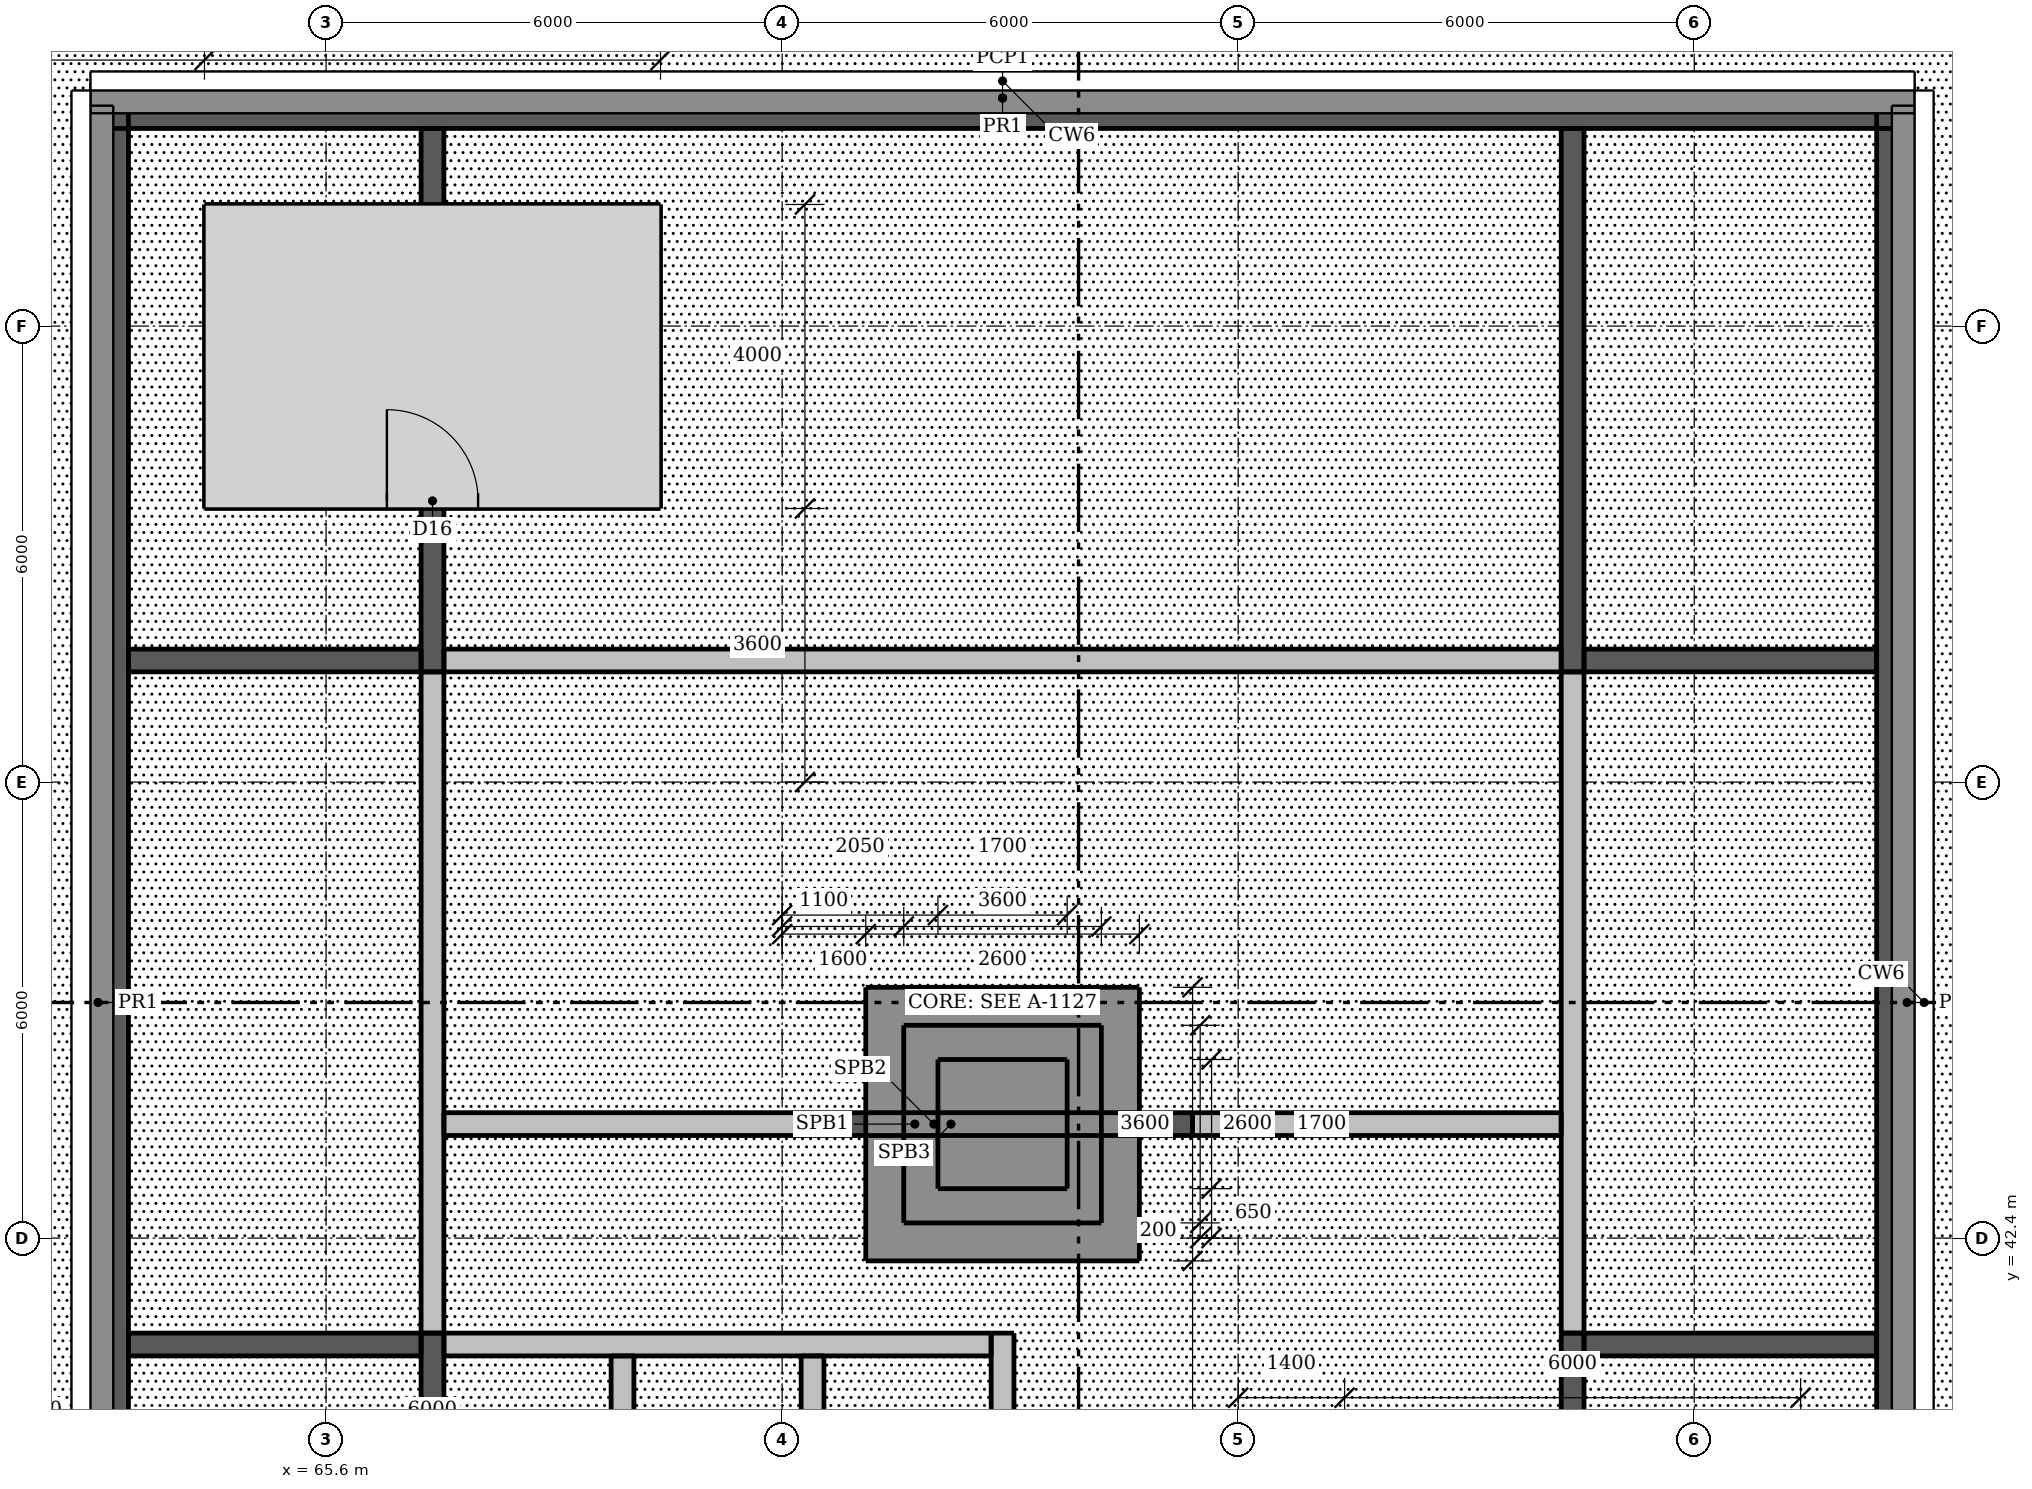
"""IFC4 building model, lengths in metres.
Left out: names, types, materials, properties, quantities, classifications, styles, units other than length and angle.
Written with IfcOpenShell. Run it as: python <this file> out.ifc"""

import sys

from ifc_helpers import new_model, si_unit, direction, frame, frame_2d, origin, place, context, subcontext, project, spatial, polyline, rectangle, outline, extrude, element, fill, save


model = new_model("IFC4")
c1 = context("Model", 3, precision=1e-05, world=origin(), true_north=direction((0.0, 1.0)))
c2 = subcontext(c1, "Body", "Model", "MODEL_VIEW")
j1 = project(units=[si_unit("LENGTHUNIT", "METRE"), si_unit("PLANEANGLEUNIT", "RADIAN")], contexts=[c1])
p1 = place(None, origin())
s1 = spatial("IfcSite", under=j1, at=p1, CompositionType="ELEMENT")
p2 = place(p1, origin())
s2 = spatial("IfcBuilding", under=s1, at=p2, CompositionType="ELEMENT")
p3 = place(p2, frame((0.0, 0.0, 301.6)))
s3 = spatial("IfcBuildingStorey", under=s2, at=p3, CompositionType="ELEMENT", Elevation=301.6)
for number, where, z_axis, x_axis in (
    (1, (62.5, 57.25, 0.0), (0.0, 0.0, 1.0), (1.0, 0.0, 0.0)),
    (2, (62.75, 33.5, 0.0), (0.0, 0.0, 1.0), (0.0, 1.0, 0.0)),
    (3, (86.25, 33.5, 0.0), (0.0, 0.0, 1.0), (0.0, 1.0, 0.0)),
):
    element("IfcWall", number, at=place(p3, frame(where, z_axis=z_axis, x_axis=x_axis)), inside=s3, PredefinedType="SHEAR", context=c2, shape_type="SweptSolid", body=[
        extrude(rectangle(XDim=24.0, YDim=0.5, at=frame_2d((12.0, 0.0))), origin(), (0.0, 0.0, 1.0), 6.9),
    ])
p4 = place(p3, frame((72.0, 43.9, 0.0), z_axis=(0.0, 0.0, 1.0), x_axis=(1.0, 0.0, 0.0)))
e4 = element("IfcWall", 4, at=p4, inside=s3, PredefinedType="SHEAR", context=c2, shape_type="SweptSolid", body=[
    extrude(rectangle(XDim=5.0, YDim=0.3, at=frame_2d((2.5, 0.0))), origin(), (0.0, 0.0, 1.0), 6.9),
])
p5 = place(p3, frame((62.5, 57.4, 7.2), z_axis=(0.0, 0.0, 1.0), x_axis=(1.0, 0.0, 0.0)))
e5 = element("IfcWall", 5, at=p5, inside=s3, PredefinedType="PARAPET", context=c2, shape_type="SweptSolid", body=[
    extrude(rectangle(XDim=24.0, YDim=0.2, at=frame_2d((12.0, 0.0))), origin(), (0.0, 0.0, 1.0), 1.1),
])
for number, where, z_axis, x_axis in (
    (6, (62.6, 33.7, 7.2), (0.0, 0.0, 1.0), (0.0, 1.0, 0.0)),
    (7, (86.4, 33.7, 7.2), (0.0, 0.0, 1.0), (0.0, 1.0, 0.0)),
):
    element("IfcWall", number, at=place(p3, frame(where, z_axis=z_axis, x_axis=x_axis)), inside=s3, PredefinedType="PARAPET", context=c2, shape_type="SweptSolid", body=[
        extrude(rectangle(XDim=23.6, YDim=0.2, at=frame_2d((11.8, 0.0))), origin(), (0.0, 0.0, 1.0), 1.1),
    ])
p6 = place(p3, frame((0.0, 0.0, 7.2)))
e8 = element("IfcWall", 8, at=p6, inside=s3, PredefinedType="SOLIDWALL", context=c2, shape_type="SweptSolid", body=[
    extrude(outline(polyline([(72.7, 42.1), (76.3, 42.1), (76.3, 45.7), (72.7, 45.7), (72.7, 42.1)]), holes=[polyline([(75.008, 44.111), (74.71, 44.408), (74.29, 44.408), (73.992, 44.111), (73.992, 43.689), (74.29, 43.392), (74.71, 43.392), (75.008, 43.689), (75.008, 44.111)])]), origin(), (0.0, 0.0, 1.0), 2.6),
])
p7 = place(p3, frame((0.0, 0.0, 9.8)))
e9 = element("IfcWall", 9, at=p7, inside=s3, PredefinedType="SOLIDWALL", context=c2, shape_type="SweptSolid", body=[
    extrude(outline(polyline([(73.2, 42.6), (75.8, 42.6), (75.8, 45.2), (73.2, 45.2), (73.2, 42.6)]), holes=[polyline([(75.008, 44.111), (74.71, 44.408), (74.29, 44.408), (73.992, 44.111), (73.992, 43.689), (74.29, 43.392), (74.71, 43.392), (75.008, 43.689), (75.008, 44.111)])]), origin(), (0.0, 0.0, 1.0), 2.6),
])
p8 = place(p3, frame((0.0, 0.0, 12.4)))
e10 = element("IfcWall", 10, at=p8, inside=s3, PredefinedType="SOLIDWALL", context=c2, shape_type="SweptSolid", body=[
    extrude(outline(polyline([(73.65, 43.05), (75.35, 43.05), (75.35, 44.75), (73.65, 44.75), (73.65, 43.05)]), holes=[polyline([(75.008, 44.111), (74.71, 44.408), (74.29, 44.408), (73.992, 44.111), (73.992, 43.689), (74.29, 43.392), (74.71, 43.392), (75.008, 43.689), (75.008, 44.111)])]), origin(), (0.0, 0.0, 1.0), 2.2),
])
p9 = place(p3, frame((64.0, 52.1, 7.2), z_axis=(0.0, 0.0, 1.0), x_axis=(1.0, 0.0, 0.0)))
e11 = element("IfcWall", 11, at=p9, inside=s3, PredefinedType="SOLIDWALL", context=c2, shape_type="SweptSolid", body=[
    extrude(rectangle(XDim=6.0, YDim=0.2, at=frame_2d((3.0, 0.0))), origin(), (0.0, 0.0, 1.0), 3.0),
])
p10 = place(p9, frame((2.4, 0.0, 0.0)))
e12 = element("IfcOpeningElement", 12, at=p10, cuts=e11, PredefinedType="OPENING", context=c2, shape_type="SweptSolid", body=[
    extrude(rectangle(XDim=1.2, YDim=2.1, at=frame_2d((0.6, 1.05))), frame((0.0, 0.11, 0.0), z_axis=(0.0, -1.0, 0.0), x_axis=(1.0, 0.0, 0.0)), (0.0, 0.0, 1.0), 0.22),
])
p11 = place(p3, frame((64.0, 55.9, 7.2), z_axis=(0.0, 0.0, 1.0), x_axis=(1.0, 0.0, 0.0)))
e13 = element("IfcWall", 13, at=p11, inside=s3, PredefinedType="SOLIDWALL", context=c2, shape_type="SweptSolid", body=[
    extrude(rectangle(XDim=6.0, YDim=0.2, at=frame_2d((3.0, 0.0))), origin(), (0.0, 0.0, 1.0), 3.0),
])
for number, where, z_axis, x_axis in (
    (14, (64.1, 52.2, 7.2), (0.0, 0.0, 1.0), (0.0, 1.0, 0.0)),
    (15, (69.9, 52.2, 7.2), (0.0, 0.0, 1.0), (0.0, 1.0, 0.0)),
):
    element("IfcWall", number, at=place(p3, frame(where, z_axis=z_axis, x_axis=x_axis)), inside=s3, PredefinedType="SOLIDWALL", context=c2, shape_type="SweptSolid", body=[
        extrude(rectangle(XDim=3.6, YDim=0.2, at=frame_2d((1.8, 0.0))), origin(), (0.0, 0.0, 1.0), 3.0),
    ])
p12 = place(p3, frame((67.0, 34.0, 0.0), z_axis=(0.0, 0.0, 1.0), x_axis=(0.0, 1.0, 0.0)))
e16 = element("IfcWall", 16, at=p12, inside=s3, PredefinedType="SHEAR", context=c2, shape_type="SweptSolid", body=[
    extrude(rectangle(XDim=7.15, YDim=0.3, at=frame_2d((3.575, 0.0))), origin(), (0.0, 0.0, 1.0), 6.9),
])
p13 = place(p12, frame((0.2, 0.0, 0.0)))
e17 = element("IfcOpeningElement", 17, at=p13, cuts=e16, PredefinedType="OPENING", context=c2, shape_type="SweptSolid", body=[
    extrude(rectangle(XDim=1.1, YDim=2.1, at=frame_2d((0.55, 1.05))), frame((0.0, 0.16, 0.0), z_axis=(0.0, -1.0, 0.0), x_axis=(1.0, 0.0, 0.0)), (0.0, 0.0, 1.0), 0.32),
])
p14 = place(p3, frame((67.0, 41.15, 0.0), z_axis=(0.0, 0.0, 1.0), x_axis=(0.0, 1.0, 0.0)))
e18 = element("IfcWall", 18, at=p14, inside=s3, PredefinedType="PARTITIONING", context=c2, shape_type="SweptSolid", body=[
    extrude(rectangle(XDim=8.7, YDim=0.3, at=frame_2d((4.35, 0.0))), origin(), (0.0, 0.0, 1.0), 6.9),
])
p15 = place(p14, frame((3.9, 0.0, 0.0)))
e19 = element("IfcOpeningElement", 19, at=p15, cuts=e18, PredefinedType="OPENING", context=c2, shape_type="SweptSolid", body=[
    extrude(rectangle(XDim=0.9, YDim=2.1, at=frame_2d((0.45, 1.05))), frame((0.0, 0.16, 0.0), z_axis=(0.0, -1.0, 0.0), x_axis=(1.0, 0.0, 0.0)), (0.0, 0.0, 1.0), 0.32),
])
p16 = place(p3, frame((67.0, 49.85, 0.0), z_axis=(0.0, 0.0, 1.0), x_axis=(0.0, 1.0, 0.0)))
e20 = element("IfcWall", 20, at=p16, inside=s3, PredefinedType="SHEAR", context=c2, shape_type="SweptSolid", body=[
    extrude(rectangle(XDim=7.15, YDim=0.3, at=frame_2d((3.575, 0.0))), origin(), (0.0, 0.0, 1.0), 6.9),
])
p17 = place(p16, frame((5.85, 0.0, 0.0)))
e21 = element("IfcOpeningElement", 21, at=p17, cuts=e20, PredefinedType="OPENING", context=c2, shape_type="SweptSolid", body=[
    extrude(rectangle(XDim=1.1, YDim=2.1, at=frame_2d((0.55, 1.05))), frame((0.0, 0.16, 0.0), z_axis=(0.0, -1.0, 0.0), x_axis=(1.0, 0.0, 0.0)), (0.0, 0.0, 1.0), 0.32),
])
p18 = place(p3, frame((82.0, 34.0, 0.0), z_axis=(0.0, 0.0, 1.0), x_axis=(0.0, 1.0, 0.0)))
e22 = element("IfcWall", 22, at=p18, inside=s3, PredefinedType="SHEAR", context=c2, shape_type="SweptSolid", body=[
    extrude(rectangle(XDim=7.15, YDim=0.3, at=frame_2d((3.575, 0.0))), origin(), (0.0, 0.0, 1.0), 6.9),
])
p19 = place(p18, frame((0.2, 0.0, 0.0)))
e23 = element("IfcOpeningElement", 23, at=p19, cuts=e22, PredefinedType="OPENING", context=c2, shape_type="SweptSolid", body=[
    extrude(rectangle(XDim=1.1, YDim=2.1, at=frame_2d((0.55, 1.05))), frame((0.0, 0.16, 0.0), z_axis=(0.0, -1.0, 0.0), x_axis=(1.0, 0.0, 0.0)), (0.0, 0.0, 1.0), 0.32),
])
p20 = place(p3, frame((82.0, 41.15, 0.0), z_axis=(0.0, 0.0, 1.0), x_axis=(0.0, 1.0, 0.0)))
e24 = element("IfcWall", 24, at=p20, inside=s3, PredefinedType="PARTITIONING", context=c2, shape_type="SweptSolid", body=[
    extrude(rectangle(XDim=8.7, YDim=0.3, at=frame_2d((4.35, 0.0))), origin(), (0.0, 0.0, 1.0), 6.9),
])
p21 = place(p20, frame((3.9, 0.0, 0.0)))
e25 = element("IfcOpeningElement", 25, at=p21, cuts=e24, PredefinedType="OPENING", context=c2, shape_type="SweptSolid", body=[
    extrude(rectangle(XDim=0.9, YDim=2.1, at=frame_2d((0.45, 1.05))), frame((0.0, 0.16, 0.0), z_axis=(0.0, -1.0, 0.0), x_axis=(1.0, 0.0, 0.0)), (0.0, 0.0, 1.0), 0.32),
])
p22 = place(p3, frame((82.0, 49.85, 0.0), z_axis=(0.0, 0.0, 1.0), x_axis=(0.0, 1.0, 0.0)))
e26 = element("IfcWall", 26, at=p22, inside=s3, PredefinedType="SHEAR", context=c2, shape_type="SweptSolid", body=[
    extrude(rectangle(XDim=7.15, YDim=0.3, at=frame_2d((3.575, 0.0))), origin(), (0.0, 0.0, 1.0), 6.9),
])
p23 = place(p22, frame((5.85, 0.0, 0.0)))
e27 = element("IfcOpeningElement", 27, at=p23, cuts=e26, PredefinedType="OPENING", context=c2, shape_type="SweptSolid", body=[
    extrude(rectangle(XDim=1.1, YDim=2.1, at=frame_2d((0.55, 1.05))), frame((0.0, 0.16, 0.0), z_axis=(0.0, -1.0, 0.0), x_axis=(1.0, 0.0, 0.0)), (0.0, 0.0, 1.0), 0.32),
])
for number, where, z_axis, x_axis in (
    (28, (63.0, 41.0, 0.0), (0.0, 0.0, 1.0), (1.0, 0.0, 0.0)),
    (29, (82.15, 41.0, 0.0), (0.0, 0.0, 1.0), (1.0, 0.0, 0.0)),
    (30, (63.0, 50.0, 0.0), (0.0, 0.0, 1.0), (1.0, 0.0, 0.0)),
    (31, (82.15, 50.0, 0.0), (0.0, 0.0, 1.0), (1.0, 0.0, 0.0)),
):
    element("IfcWall", number, at=place(p3, frame(where, z_axis=z_axis, x_axis=x_axis)), inside=s3, PredefinedType="SHEAR", context=c2, shape_type="SweptSolid", body=[
        extrude(rectangle(XDim=3.85, YDim=0.3, at=frame_2d((1.925, 0.0))), origin(), (0.0, 0.0, 1.0), 6.9),
    ])
p24 = place(p3, frame((67.15, 50.0, 0.0), z_axis=(0.0, 0.0, 1.0), x_axis=(1.0, 0.0, 0.0)))
e32 = element("IfcWall", 32, at=p24, inside=s3, PredefinedType="PARTITIONING", context=c2, shape_type="SweptSolid", body=[
    extrude(rectangle(XDim=14.7, YDim=0.3, at=frame_2d((7.35, 0.0))), origin(), (0.0, 0.0, 1.0), 6.9),
])
p25 = place(p24, frame((6.9, 0.0, 0.0)))
e33 = element("IfcOpeningElement", 33, at=p25, cuts=e32, PredefinedType="OPENING", context=c2, shape_type="SweptSolid", body=[
    extrude(rectangle(XDim=0.9, YDim=2.1, at=frame_2d((0.45, 1.05))), frame((0.0, 0.16, 0.0), z_axis=(0.0, -1.0, 0.0), x_axis=(1.0, 0.0, 0.0)), (0.0, 0.0, 1.0), 0.32),
])
p26 = place(p3, frame((67.15, 43.9, 0.0), z_axis=(0.0, 0.0, 1.0), x_axis=(1.0, 0.0, 0.0)))
e34 = element("IfcWall", 34, at=p26, inside=s3, PredefinedType="PARTITIONING", context=c2, shape_type="SweptSolid", body=[
    extrude(rectangle(XDim=4.85, YDim=0.3, at=frame_2d((2.425, 0.0))), origin(), (0.0, 0.0, 1.0), 6.9),
])
p27 = place(p26, frame((1.9, 0.0, 0.0)))
e35 = element("IfcOpeningElement", 35, at=p27, cuts=e34, PredefinedType="OPENING", context=c2, shape_type="SweptSolid", body=[
    extrude(rectangle(XDim=0.9, YDim=2.1, at=frame_2d((0.45, 1.05))), frame((0.0, 0.16, 0.0), z_axis=(0.0, -1.0, 0.0), x_axis=(1.0, 0.0, 0.0)), (0.0, 0.0, 1.0), 0.32),
])
p28 = place(p3, frame((77.0, 43.9, 0.0), z_axis=(0.0, 0.0, 1.0), x_axis=(1.0, 0.0, 0.0)))
e36 = element("IfcWall", 36, at=p28, inside=s3, PredefinedType="PARTITIONING", context=c2, shape_type="SweptSolid", body=[
    extrude(rectangle(XDim=4.85, YDim=0.3, at=frame_2d((2.425, 0.0))), origin(), (0.0, 0.0, 1.0), 6.9),
])
p29 = place(p3, frame((67.15, 41.0, 0.0), z_axis=(0.0, 0.0, 1.0), x_axis=(1.0, 0.0, 0.0)))
e37 = element("IfcWall", 37, at=p29, inside=s3, PredefinedType="PARTITIONING", context=c2, shape_type="SweptSolid", body=[
    extrude(rectangle(XDim=7.2, YDim=0.3, at=frame_2d((3.6, 0.0))), origin(), (0.0, 0.0, 1.0), 6.9),
])
for number, where, z_axis, x_axis in (
    (38, (69.5, 38.25, 0.0), (0.0, 0.0, 1.0), (0.0, 1.0, 0.0)),
    (39, (72.0, 38.25, 0.0), (0.0, 0.0, 1.0), (0.0, 1.0, 0.0)),
):
    element("IfcWall", number, at=place(p3, frame(where, z_axis=z_axis, x_axis=x_axis)), inside=s3, PredefinedType="PARTITIONING", context=c2, shape_type="SweptSolid", body=[
        extrude(rectangle(XDim=2.6, YDim=0.3, at=frame_2d((1.3, 0.0))), origin(), (0.0, 0.0, 1.0), 6.9),
    ])
p30 = place(p3, frame((74.5, 37.95, 0.0), z_axis=(0.0, 0.0, 1.0), x_axis=(0.0, 1.0, 0.0)))
e40 = element("IfcWall", 40, at=p30, inside=s3, PredefinedType="PARTITIONING", context=c2, shape_type="SweptSolid", body=[
    extrude(rectangle(XDim=3.2, YDim=0.3, at=frame_2d((1.6, 0.0))), origin(), (0.0, 0.0, 1.0), 6.9),
])
p31 = place(p10, origin())
e41 = element("IfcDoor", 41, at=p31, inside=s3, OperationType="SINGLE_SWING_LEFT", PredefinedType="DOOR", context=c2, shape_type="SweptSolid", body=[
    extrude(rectangle(XDim=1.2, YDim=2.1, at=frame_2d((0.6, 1.05))), frame((0.0, 0.025, 0.0), z_axis=(0.0, -1.0, 0.0), x_axis=(1.0, 0.0, 0.0)), (0.0, 0.0, 1.0), 0.05),
])
fill(e12, e41)
p32 = place(p17, origin())
e42 = element("IfcDoor", 42, at=p32, inside=s3, OperationType="SINGLE_SWING_LEFT", PredefinedType="DOOR", context=c2, shape_type="SweptSolid", body=[
    extrude(rectangle(XDim=1.1, YDim=2.1, at=frame_2d((0.55, 1.05))), frame((0.0, 0.138, 0.0), z_axis=(0.0, -1.0, 0.0), x_axis=(1.0, 0.0, 0.0)), (0.0, 0.0, 1.0), 0.05),
])
fill(e21, e42)
p33 = place(p23, origin())
e43 = element("IfcDoor", 43, at=p33, inside=s3, OperationType="SINGLE_SWING_RIGHT", PredefinedType="DOOR", context=c2, shape_type="SweptSolid", body=[
    extrude(rectangle(XDim=1.1, YDim=2.1, at=frame_2d((0.55, 1.05))), frame((0.0, -0.087, 0.0), z_axis=(0.0, -1.0, 0.0), x_axis=(1.0, 0.0, 0.0)), (0.0, 0.0, 1.0), 0.05),
])
fill(e27, e43)
p34 = place(p27, origin())
e44 = element("IfcDoor", 44, at=p34, inside=s3, OperationType="SINGLE_SWING_LEFT", PredefinedType="DOOR", context=c2, shape_type="SweptSolid", body=[
    extrude(rectangle(XDim=0.9, YDim=2.1, at=frame_2d((0.45, 1.05))), frame((0.0, 0.138, 0.0), z_axis=(0.0, -1.0, 0.0), x_axis=(1.0, 0.0, 0.0)), (0.0, 0.0, 1.0), 0.05),
])
fill(e35, e44)
p35 = place(p25, origin())
e45 = element("IfcDoor", 45, at=p35, inside=s3, OperationType="SINGLE_SWING_RIGHT", PredefinedType="DOOR", context=c2, shape_type="SweptSolid", body=[
    extrude(rectangle(XDim=0.9, YDim=2.1, at=frame_2d((0.45, 1.05))), frame((0.0, -0.087, 0.0), z_axis=(0.0, -1.0, 0.0), x_axis=(1.0, 0.0, 0.0)), (0.0, 0.0, 1.0), 0.05),
])
fill(e33, e45)
p36 = place(p15, origin())
e46 = element("IfcDoor", 46, at=p36, inside=s3, OperationType="SINGLE_SWING_LEFT", PredefinedType="DOOR", context=c2, shape_type="SweptSolid", body=[
    extrude(rectangle(XDim=0.9, YDim=2.1, at=frame_2d((0.45, 1.05))), frame((0.0, 0.138, 0.0), z_axis=(0.0, -1.0, 0.0), x_axis=(1.0, 0.0, 0.0)), (0.0, 0.0, 1.0), 0.05),
])
fill(e19, e46)
p37 = place(p21, origin())
e47 = element("IfcDoor", 47, at=p37, inside=s3, OperationType="SINGLE_SWING_RIGHT", PredefinedType="DOOR", context=c2, shape_type="SweptSolid", body=[
    extrude(rectangle(XDim=0.9, YDim=2.1, at=frame_2d((0.45, 1.05))), frame((0.0, -0.087, 0.0), z_axis=(0.0, -1.0, 0.0), x_axis=(1.0, 0.0, 0.0)), (0.0, 0.0, 1.0), 0.05),
])
fill(e25, e47)
save(model, sys.argv[1])
